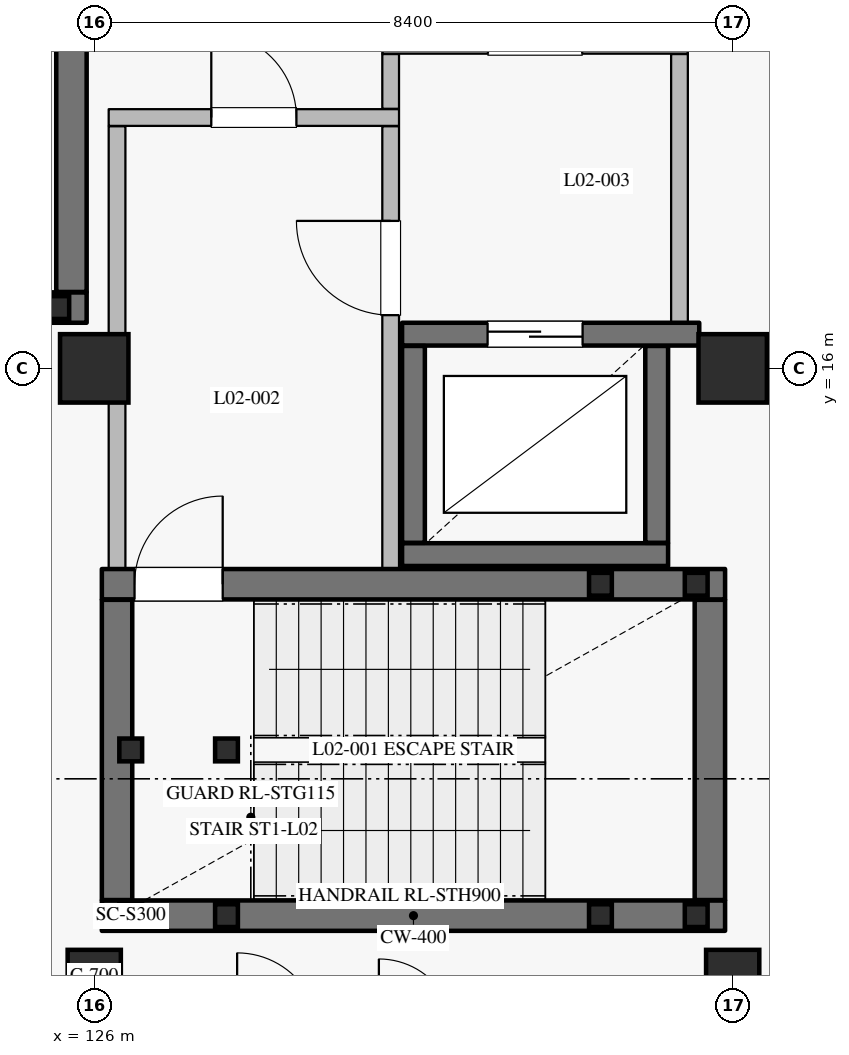
"""IFC4 building model, lengths in metres.
Left out: names, types, materials, properties, quantities, classifications, styles, units other than length and angle.
Written with IfcOpenShell. Run it as: python <this file> out.ifc"""

import sys

from ifc_helpers import new_model, si_unit, direction, frame, frame_2d, origin, origin_2d, place, context, subcontext, project, spatial, rectangle, hollow_rectangle, extrude, element, fill, save


model = new_model("IFC4")
c1 = context("Model", 3, precision=1e-05, world=origin(), true_north=direction((0.0, 1.0)))
c2 = subcontext(c1, "Body", "Model", "MODEL_VIEW")
j1 = project(units=[si_unit("LENGTHUNIT", "METRE"), si_unit("PLANEANGLEUNIT", "RADIAN")], contexts=[c1])
p1 = place(None, origin())
s1 = spatial("IfcSite", under=j1, at=p1, CompositionType="ELEMENT")
p2 = place(p1, origin())
s2 = spatial("IfcBuilding", under=s1, at=p2, CompositionType="ELEMENT")
p3 = place(p2, frame((0.0, 0.0, 11.4)))
s3 = spatial("IfcBuildingStorey", under=s2, at=p3, CompositionType="ELEMENT", Elevation=11.4)
for number, where, z_axis, x_axis in (
    (1, (126.0, 16.0, 0.0), (0.0, 0.0, 1.0), (1.0, 0.0, 0.0)),
    (2, (134.4, 16.0, 0.0), (0.0, 0.0, 1.0), (1.0, 0.0, 0.0)),
):
    element("IfcColumn", number, at=place(p3, frame(where, z_axis=z_axis, x_axis=x_axis)), inside=s3, PredefinedType="COLUMN", context=c2, shape_type="SweptSolid", body=[
        extrude(rectangle(XDim=0.9, YDim=0.9, at=origin_2d()), origin(), (0.0, 0.0, 1.0), 4.8),
    ])
for number, where, z_axis, x_axis in (
    (3, (126.0, 8.0, 0.0), (0.0, 0.0, 1.0), (1.0, 0.0, 0.0)),
    (4, (134.4, 8.0, 0.0), (0.0, 0.0, 1.0), (1.0, 0.0, 0.0)),
):
    element("IfcColumn", number, at=place(p3, frame(where, z_axis=z_axis, x_axis=x_axis)), inside=s3, PredefinedType="COLUMN", context=c2, shape_type="SweptSolid", body=[
        extrude(rectangle(XDim=0.7, YDim=0.7, at=origin_2d()), origin(), (0.0, 0.0, 1.0), 4.8),
    ])
p4 = place(p3, frame((130.05, 13.55, 0.0), z_axis=(0.0, 0.0, 1.0), x_axis=(1.0, 0.0, 0.0)))
e5 = element("IfcWall", 5, at=p4, inside=s3, PredefinedType="SHEAR", context=c2, shape_type="SweptSolid", body=[
    extrude(rectangle(XDim=3.5, YDim=0.3, at=frame_2d((1.75, 0.0))), origin(), (0.0, 0.0, 1.0), 4.535),
])
p5 = place(p3, frame((133.4, 13.705, 0.0), z_axis=(0.0, 0.0, 1.0), x_axis=(0.0, 1.0, 0.0)))
e6 = element("IfcWall", 6, at=p5, inside=s3, PredefinedType="SHEAR", context=c2, shape_type="SweptSolid", body=[
    extrude(rectangle(XDim=2.59, YDim=0.3, at=frame_2d((1.295, 0.0))), origin(), (0.0, 0.0, 1.0), 4.535),
])
p6 = place(p3, frame((133.96, 16.45, 0.0), z_axis=(0.0, 0.0, 1.0), x_axis=(-1.0, 0.0, 0.0)))
e7 = element("IfcWall", 7, at=p6, inside=s3, PredefinedType="SHEAR", context=c2, shape_type="SweptSolid", body=[
    extrude(rectangle(XDim=3.91, YDim=0.3, at=frame_2d((1.955, 0.0))), origin(), (0.0, 0.0, 1.0), 4.535),
])
p7 = place(p6, frame((1.535, 0.0, 0.0)))
e8 = element("IfcOpeningElement", 8, at=p7, cuts=e7, PredefinedType="OPENING", context=c2, shape_type="SweptSolid", body=[
    extrude(rectangle(XDim=1.25, YDim=2.25, at=frame_2d((0.625, 1.125))), frame((0.0, 0.16, 0.0), z_axis=(0.0, -1.0, 0.0), x_axis=(1.0, 0.0, 0.0)), (0.0, 0.0, 1.0), 0.32),
])
p8 = place(p3, frame((130.2, 16.295, 0.0), z_axis=(0.0, 0.0, 1.0), x_axis=(0.0, -1.0, 0.0)))
e9 = element("IfcWall", 9, at=p8, inside=s3, PredefinedType="SHEAR", context=c2, shape_type="SweptSolid", body=[
    extrude(rectangle(XDim=2.59, YDim=0.3, at=frame_2d((1.295, 0.0))), origin(), (0.0, 0.0, 1.0), 4.535),
])
p9 = place(p3, frame((126.1, 8.8, 0.0), z_axis=(0.0, 0.0, 1.0), x_axis=(1.0, 0.0, 0.0)))
e10 = element("IfcWall", 10, at=p9, inside=s3, PredefinedType="SHEAR", context=c2, shape_type="SweptSolid", body=[
    extrude(rectangle(XDim=8.2, YDim=0.4, at=frame_2d((4.1, 0.0))), origin(), (0.0, 0.0, 1.0), 4.535),
])
p10 = place(p3, frame((134.1, 9.005, 0.0), z_axis=(0.0, 0.0, 1.0), x_axis=(0.0, 1.0, 0.0)))
e11 = element("IfcWall", 11, at=p10, inside=s3, PredefinedType="SHEAR", context=c2, shape_type="SweptSolid", body=[
    extrude(rectangle(XDim=3.95, YDim=0.4, at=frame_2d((1.975, 0.0))), origin(), (0.0, 0.0, 1.0), 4.535),
])
p11 = place(p3, frame((126.1, 13.16, 0.0), z_axis=(0.0, 0.0, 1.0), x_axis=(1.0, 0.0, 0.0)))
e12 = element("IfcWall", 12, at=p11, inside=s3, PredefinedType="SHEAR", context=c2, shape_type="SweptSolid", body=[
    extrude(rectangle(XDim=8.2, YDim=0.4, at=frame_2d((4.1, 0.0))), origin(), (0.0, 0.0, 1.0), 4.535),
])
p12 = place(p11, frame((0.43, 0.0, 0.0)))
e13 = element("IfcOpeningElement", 13, at=p12, cuts=e12, PredefinedType="OPENING", context=c2, shape_type="SweptSolid", body=[
    extrude(rectangle(XDim=1.16, YDim=2.2, at=frame_2d((0.58, 1.1))), frame((0.0, 0.21, 0.0), z_axis=(0.0, -1.0, 0.0), x_axis=(1.0, 0.0, 0.0)), (0.0, 0.0, 1.0), 0.42),
])
p13 = place(p3, frame((126.3, 9.005, 0.0), z_axis=(0.0, 0.0, 1.0), x_axis=(0.0, 1.0, 0.0)))
e14 = element("IfcWall", 14, at=p13, inside=s3, PredefinedType="SHEAR", context=c2, shape_type="SweptSolid", body=[
    extrude(rectangle(XDim=3.95, YDim=0.4, at=frame_2d((1.975, 0.0))), origin(), (0.0, 0.0, 1.0), 4.535),
])
p14 = place(p3, frame((126.3, 13.365, 0.0), z_axis=(0.0, 0.0, 1.0), x_axis=(0.0, 1.0, 0.0)))
e15 = element("IfcWall", 15, at=p14, inside=s3, PredefinedType="PARTITIONING", context=c2, shape_type="SweptSolid", body=[
    extrude(rectangle(XDim=5.82, YDim=0.22, at=frame_2d((2.91, 0.0))), origin(), (0.0, 0.0, 1.0), 4.535),
])
p15 = place(p3, frame((126.19, 19.3, 0.0), z_axis=(0.0, 0.0, 1.0), x_axis=(1.0, 0.0, 0.0)))
e16 = element("IfcWall", 16, at=p15, inside=s3, PredefinedType="PARTITIONING", context=c2, shape_type="SweptSolid", body=[
    extrude(rectangle(XDim=3.82, YDim=0.22, at=frame_2d((1.91, 0.0))), origin(), (0.0, 0.0, 1.0), 4.535),
])
p16 = place(p15, frame((1.35, 0.0, 0.0)))
e17 = element("IfcOpeningElement", 17, at=p16, cuts=e16, PredefinedType="OPENING", context=c2, shape_type="SweptSolid", body=[
    extrude(rectangle(XDim=1.12, YDim=2.2, at=frame_2d((0.56, 1.1))), frame((0.0, 0.12, 0.0), z_axis=(0.0, -1.0, 0.0), x_axis=(1.0, 0.0, 0.0)), (0.0, 0.0, 1.0), 0.24),
])
p17 = place(p3, frame((129.9, 13.365, 0.0), z_axis=(0.0, 0.0, 1.0), x_axis=(0.0, 1.0, 0.0)))
e18 = element("IfcWall", 18, at=p17, inside=s3, PredefinedType="PARTITIONING", context=c2, shape_type="SweptSolid", body=[
    extrude(rectangle(XDim=5.82, YDim=0.22, at=frame_2d((2.91, 0.0))), origin(), (0.0, 0.0, 1.0), 4.535),
])
p18 = place(p17, frame((3.335, 0.0, 0.0)))
e19 = element("IfcOpeningElement", 19, at=p18, cuts=e18, PredefinedType="OPENING", context=c2, shape_type="SweptSolid", body=[
    extrude(rectangle(XDim=1.24, YDim=2.2, at=frame_2d((0.62, 1.1))), frame((0.0, 0.12, 0.0), z_axis=(0.0, -1.0, 0.0), x_axis=(1.0, 0.0, 0.0)), (0.0, 0.0, 1.0), 0.24),
])
p19 = place(p3, frame((129.9, 19.415, 0.0), z_axis=(0.0, 0.0, 1.0), x_axis=(0.0, 1.0, 0.0)))
e20 = element("IfcWall", 20, at=p19, inside=s3, PredefinedType="PARTITIONING", context=c2, shape_type="SweptSolid", body=[
    extrude(rectangle(XDim=0.72, YDim=0.22, at=frame_2d((0.36, 0.0))), origin(), (0.0, 0.0, 1.0), 4.535),
])
p20 = place(p3, frame((133.7, 16.605, 0.0), z_axis=(0.0, 0.0, 1.0), x_axis=(0.0, 1.0, 0.0)))
e21 = element("IfcWall", 21, at=p20, inside=s3, PredefinedType="PARTITIONING", context=c2, shape_type="SweptSolid", body=[
    extrude(rectangle(XDim=3.53, YDim=0.22, at=frame_2d((1.765, 0.0))), origin(), (0.0, 0.0, 1.0), 4.535),
])
p21 = place(p3, frame((129.79, 20.25, 0.0), z_axis=(0.0, 0.0, 1.0), x_axis=(1.0, 0.0, 0.0)))
e22 = element("IfcWall", 22, at=p21, inside=s3, PredefinedType="PARTITIONING", context=c2, shape_type="SweptSolid", body=[
    extrude(rectangle(XDim=4.02, YDim=0.22, at=frame_2d((2.01, 0.0))), origin(), (0.0, 0.0, 1.0), 4.535),
])
p22 = place(p21, frame((1.39, 0.0, 0.0)))
e23 = element("IfcOpeningElement", 23, at=p22, cuts=e22, PredefinedType="OPENING", context=c2, shape_type="SweptSolid", body=[
    extrude(rectangle(XDim=1.24, YDim=2.2, at=frame_2d((0.62, 1.1))), frame((0.0, 0.12, 0.0), z_axis=(0.0, -1.0, 0.0), x_axis=(1.0, 0.0, 0.0)), (0.0, 0.0, 1.0), 0.24),
])
for number, where, z_axis, x_axis in (
    (24, (126.48, 8.8, 0.0), (0.0, 0.0, 1.0), (1.0, 0.0, 0.0)),
    (25, (126.48, 10.98, 0.0), (0.0, 0.0, 1.0), (1.0, 0.0, 0.0)),
    (26, (127.74, 8.8, 0.0), (0.0, 0.0, 1.0), (1.0, 0.0, 0.0)),
    (27, (127.74, 10.98, 0.0), (0.0, 0.0, 1.0), (1.0, 0.0, 0.0)),
):
    element("IfcColumn", number, at=place(p3, frame(where, z_axis=z_axis, x_axis=x_axis)), inside=s3, PredefinedType="COLUMN", context=c2, shape_type="SweptSolid", body=[
        extrude(hollow_rectangle(XDim=0.3, YDim=0.3, WallThickness=0.012, at=origin_2d()), origin(), (0.0, 0.0, 1.0), 4.62),
    ])
for number, where, z_axis, x_axis in (
    (28, (132.66, 8.8, -2.7), (0.0, 0.0, 1.0), (1.0, 0.0, 0.0)),
    (29, (132.66, 13.16, -2.7), (0.0, 0.0, 1.0), (1.0, 0.0, 0.0)),
    (30, (133.92, 8.8, -2.7), (0.0, 0.0, 1.0), (1.0, 0.0, 0.0)),
    (31, (133.92, 13.16, -2.7), (0.0, 0.0, 1.0), (1.0, 0.0, 0.0)),
):
    element("IfcColumn", number, at=place(p3, frame(where, z_axis=z_axis, x_axis=x_axis)), inside=s3, PredefinedType="COLUMN", context=c2, shape_type="SweptSolid", body=[
        extrude(hollow_rectangle(XDim=0.3, YDim=0.3, WallThickness=0.012, at=origin_2d()), origin(), (0.0, 0.0, 1.0), 4.92),
    ])
p23 = place(p3, frame((117.7, 16.8, 0.0), z_axis=(0.0, 0.0, 1.0), x_axis=(1.0, 0.0, 0.0)))
e32 = element("IfcWall", 32, at=p23, inside=s3, PredefinedType="SHEAR", context=c2, shape_type="SweptSolid", body=[
    extrude(rectangle(XDim=8.2, YDim=0.4, at=frame_2d((4.1, 0.0))), origin(), (0.0, 0.0, 1.0), 4.535),
])
p24 = place(p3, frame((125.7, 17.005, 0.0), z_axis=(0.0, 0.0, 1.0), x_axis=(0.0, 1.0, 0.0)))
e33 = element("IfcWall", 33, at=p24, inside=s3, PredefinedType="SHEAR", context=c2, shape_type="SweptSolid", body=[
    extrude(rectangle(XDim=3.95, YDim=0.4, at=frame_2d((1.975, 0.0))), origin(), (0.0, 0.0, 1.0), 4.535),
])
p25 = place(p3, frame((125.52, 16.8, -2.7), z_axis=(0.0, 0.0, 1.0), x_axis=(1.0, 0.0, 0.0)))
e34 = element("IfcColumn", 34, at=p25, inside=s3, PredefinedType="COLUMN", context=c2, shape_type="SweptSolid", body=[
    extrude(hollow_rectangle(XDim=0.3, YDim=0.3, WallThickness=0.012, at=origin_2d()), origin(), (0.0, 0.0, 1.0), 4.92),
])
p26 = place(p7, origin())
e35 = element("IfcDoor", 35, at=p26, inside=s3, OperationType="DOUBLE_DOOR_SLIDING", PredefinedType="DOOR", context=c2, shape_type="SweptSolid", body=[
    extrude(rectangle(XDim=1.25, YDim=2.25, at=frame_2d((0.625, 1.125))), frame((0.0, 0.025, 0.0), z_axis=(0.0, -1.0, 0.0), x_axis=(1.0, 0.0, 0.0)), (0.0, 0.0, 1.0), 0.05),
])
fill(e8, e35)
p27 = place(p12, origin())
e36 = element("IfcDoor", 36, at=p27, inside=s3, OperationType="SINGLE_SWING_RIGHT", PredefinedType="DOOR", context=c2, shape_type="SweptSolid", body=[
    extrude(rectangle(XDim=1.16, YDim=2.2, at=frame_2d((0.58, 1.1))), frame((0.0, 0.025, 0.0), z_axis=(0.0, -1.0, 0.0), x_axis=(1.0, 0.0, 0.0)), (0.0, 0.0, 1.0), 0.05),
])
fill(e13, e36)
p28 = place(p16, origin())
e37 = element("IfcDoor", 37, at=p28, inside=s3, OperationType="SINGLE_SWING_LEFT", PredefinedType="DOOR", context=c2, shape_type="SweptSolid", body=[
    extrude(rectangle(XDim=1.12, YDim=2.2, at=frame_2d((0.56, 1.1))), frame((0.0, 0.025, 0.0), z_axis=(0.0, -1.0, 0.0), x_axis=(1.0, 0.0, 0.0)), (0.0, 0.0, 1.0), 0.05),
])
fill(e17, e37)
p29 = place(p18, origin())
e38 = element("IfcDoor", 38, at=p29, inside=s3, OperationType="SINGLE_SWING_RIGHT", PredefinedType="DOOR", context=c2, shape_type="SweptSolid", body=[
    extrude(rectangle(XDim=1.24, YDim=2.2, at=frame_2d((0.62, 1.1))), frame((0.0, 0.025, 0.0), z_axis=(0.0, -1.0, 0.0), x_axis=(1.0, 0.0, 0.0)), (0.0, 0.0, 1.0), 0.05),
])
fill(e19, e38)
save(model, sys.argv[1])
